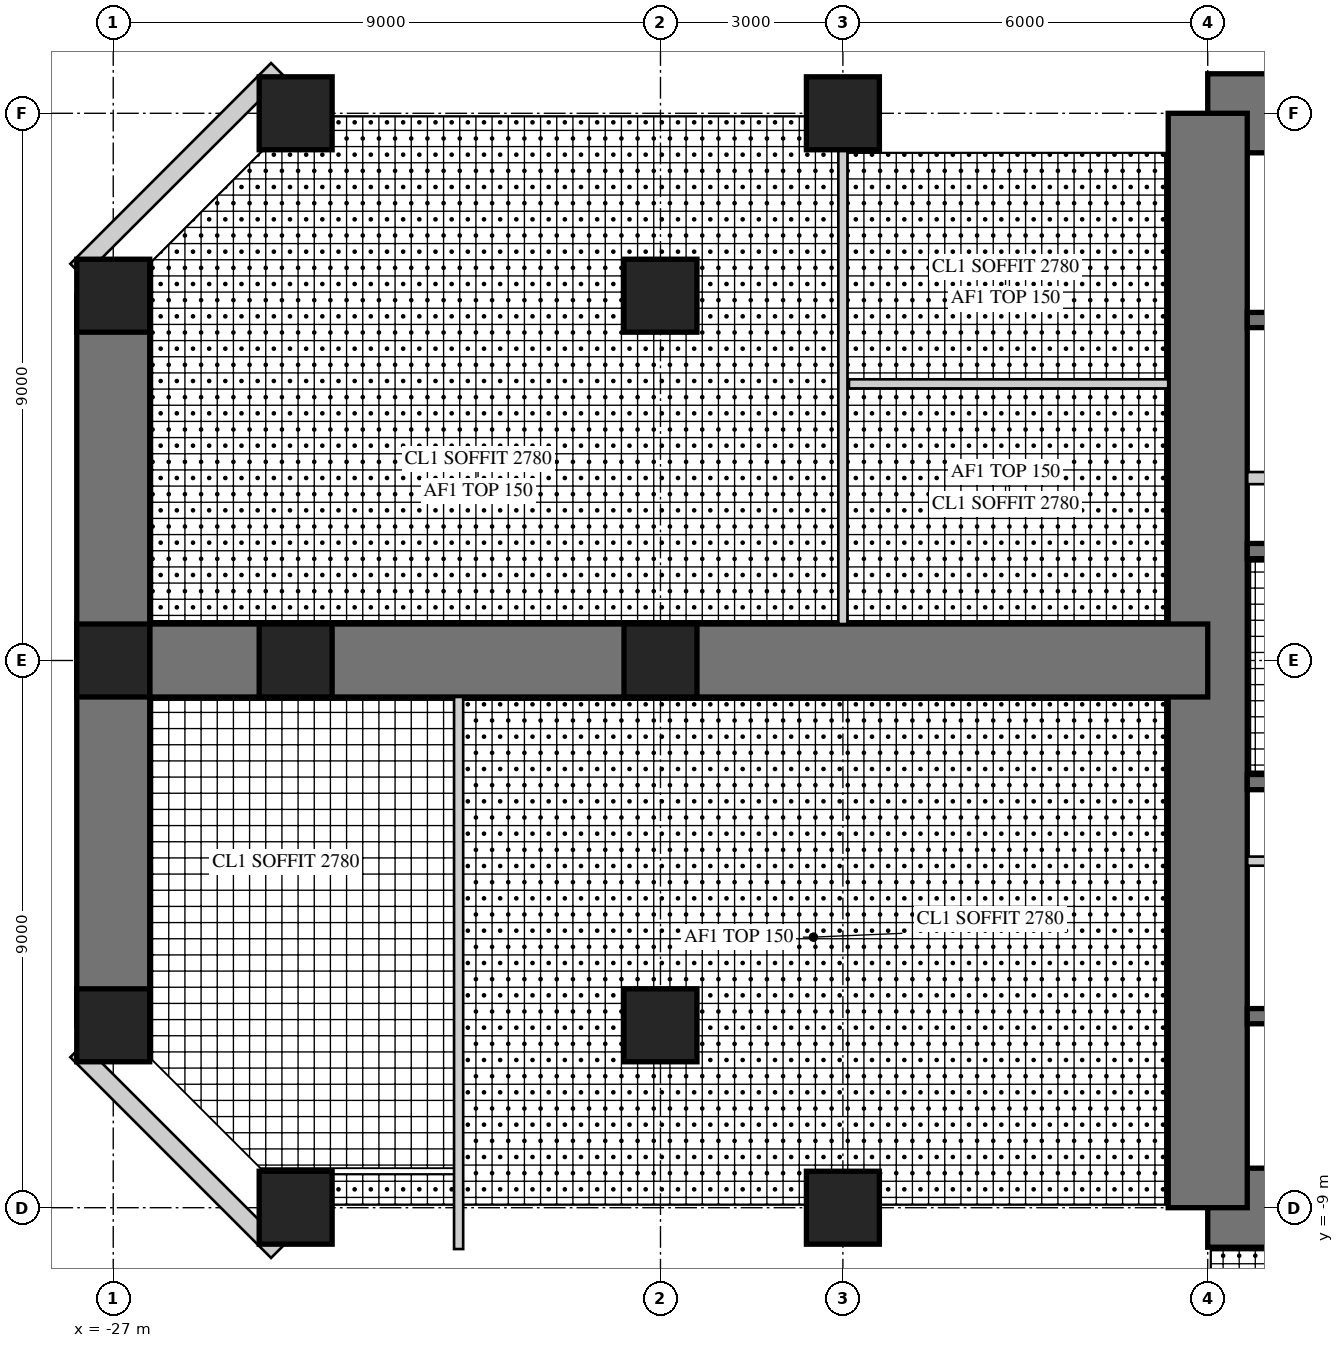
"""IFC4 building model, lengths in metres.
Left out: names, types, materials, properties, quantities, classifications, styles, units other than length and angle.
Written with IfcOpenShell. Run it as: python <this file> out.ifc"""

import sys

from ifc_helpers import new_model, si_unit, direction, frame, frame_2d, origin, origin_2d, place, context, subcontext, project, spatial, rectangle, hollow_rectangle, extrude, element, fill, save


model = new_model("IFC4")
c1 = context("Model", 3, precision=1e-05, world=origin(), true_north=direction((0.0, 1.0)))
c2 = subcontext(c1, "Body", "Model", "MODEL_VIEW")
j1 = project(units=[si_unit("LENGTHUNIT", "METRE"), si_unit("PLANEANGLEUNIT", "RADIAN")], contexts=[c1])
p1 = place(None, origin())
s1 = spatial("IfcSite", under=j1, at=p1, CompositionType="ELEMENT")
p2 = place(p1, origin())
s2 = spatial("IfcBuilding", under=s1, at=p2, CompositionType="ELEMENT")
p3 = place(p2, frame((0.0, 0.0, 59.5)))
s3 = spatial("IfcBuildingStorey", under=s2, at=p3, CompositionType="ELEMENT", Elevation=59.5)
p4 = place(p3, frame((9.0, 9.0, 0.0), z_axis=(0.0, 0.0, 1.0), x_axis=(-1.0, 0.0, 0.0)))
e1 = element("IfcWall", 1, at=p4, inside=s3, PredefinedType="SHEAR", context=c2, shape_type="SweptSolid", body=[
    extrude(rectangle(XDim=18.0, YDim=1.3, at=frame_2d((9.0, 0.0))), origin(), (0.0, 0.0, 1.0), 4.0),
])
p5 = place(p4, frame((9.8, 0.0, 0.0)))
e2 = element("IfcOpeningElement", 2, at=p5, cuts=e1, PredefinedType="OPENING", context=c2, shape_type="SweptSolid", body=[
    extrude(rectangle(XDim=1.0, YDim=2.4, at=frame_2d((0.5, 1.2))), frame((0.0, 0.66, 0.0), z_axis=(0.0, -1.0, 0.0), x_axis=(1.0, 0.0, 0.0)), (0.0, 0.0, 1.0), 1.32),
])
p6 = place(p3, frame((-9.0, -9.0, 0.0), z_axis=(0.0, 0.0, 1.0), x_axis=(1.0, 0.0, 0.0)))
e3 = element("IfcWall", 3, at=p6, inside=s3, PredefinedType="SHEAR", context=c2, shape_type="SweptSolid", body=[
    extrude(rectangle(XDim=18.0, YDim=1.3, at=frame_2d((9.0, 0.0))), origin(), (0.0, 0.0, 1.0), 4.0),
])
p7 = place(p6, frame((9.8, 0.0, 0.0)))
e4 = element("IfcOpeningElement", 4, at=p7, cuts=e3, PredefinedType="OPENING", context=c2, shape_type="SweptSolid", body=[
    extrude(rectangle(XDim=1.0, YDim=2.4, at=frame_2d((0.5, 1.2))), frame((0.0, 0.66, 0.0), z_axis=(0.0, -1.0, 0.0), x_axis=(1.0, 0.0, 0.0)), (0.0, 0.0, 1.0), 1.32),
])
p8 = place(p3, frame((-9.0, 9.0, 0.0), z_axis=(0.0, 0.0, 1.0), x_axis=(0.0, -1.0, 0.0)))
e5 = element("IfcWall", 5, at=p8, inside=s3, PredefinedType="SHEAR", context=c2, shape_type="SweptSolid", body=[
    extrude(rectangle(XDim=18.0, YDim=1.3, at=frame_2d((9.0, 0.0))), origin(), (0.0, 0.0, 1.0), 4.0),
])
p9 = place(p8, frame((9.8, 0.0, 0.0)))
e6 = element("IfcOpeningElement", 6, at=p9, cuts=e5, PredefinedType="OPENING", context=c2, shape_type="SweptSolid", body=[
    extrude(rectangle(XDim=1.0, YDim=2.4, at=frame_2d((0.5, 1.2))), frame((0.0, 0.66, 0.0), z_axis=(0.0, -1.0, 0.0), x_axis=(1.0, 0.0, 0.0)), (0.0, 0.0, 1.0), 1.32),
])
p10 = place(p3, frame((-2.125, 1.8, 0.0), z_axis=(0.0, 0.0, 1.0), x_axis=(-1.0, 0.0, 0.0)))
e7 = element("IfcWall", 7, at=p10, inside=s3, PredefinedType="SHEAR", context=c2, shape_type="SweptSolid", body=[
    extrude(rectangle(XDim=6.225, YDim=0.25, at=frame_2d((3.113, 0.0))), origin(), (0.0, 0.0, 1.0), 4.0),
])
p11 = place(p3, frame((-2.125, 5.6, 0.0), z_axis=(0.0, 0.0, 1.0), x_axis=(-1.0, 0.0, 0.0)))
e8 = element("IfcWall", 8, at=p11, inside=s3, PredefinedType="SHEAR", context=c2, shape_type="SweptSolid", body=[
    extrude(rectangle(XDim=6.225, YDim=0.25, at=frame_2d((3.113, 0.0))), origin(), (0.0, 0.0, 1.0), 4.0),
])
p12 = place(p11, frame((0.175, 0.0, 0.0)))
e9 = element("IfcOpeningElement", 9, at=p12, cuts=e8, PredefinedType="OPENING", context=c2, shape_type="SweptSolid", body=[
    extrude(rectangle(XDim=1.0, YDim=2.1, at=frame_2d((0.5, 1.05))), frame((0.0, 0.135, 0.0), z_axis=(0.0, -1.0, 0.0), x_axis=(1.0, 0.0, 0.0)), (0.0, 0.0, 1.0), 0.27),
])
p13 = place(p3, frame((-5.725, 3.0, 0.0), z_axis=(0.0, 0.0, 1.0), x_axis=(-1.0, 0.0, 0.0)))
e10 = element("IfcWall", 10, at=p13, inside=s3, PredefinedType="PARTITIONING", context=c2, shape_type="SweptSolid", body=[
    extrude(rectangle(XDim=2.625, YDim=0.2, at=frame_2d((1.312, 0.0))), origin(), (0.0, 0.0, 1.0), 4.0),
])
for number, where, z_axis, x_axis in (
    (11, (-1.925, -2.0, 0.0), (0.0, 0.0, 1.0), (-1.0, 0.0, 0.0)),
    (12, (-1.925, -5.85, 0.0), (0.0, 0.0, 1.0), (-1.0, 0.0, 0.0)),
):
    element("IfcWall", number, at=place(p3, frame(where, z_axis=z_axis, x_axis=x_axis)), inside=s3, PredefinedType="SHEAR", context=c2, shape_type="SweptSolid", body=[
        extrude(rectangle(XDim=6.425, YDim=0.25, at=frame_2d((3.212, 0.0))), origin(), (0.0, 0.0, 1.0), 4.0),
    ])
p14 = place(p3, frame((-1.925, -3.3, 0.0), z_axis=(0.0, 0.0, 1.0), x_axis=(-1.0, 0.0, 0.0)))
e13 = element("IfcWall", 13, at=p14, inside=s3, PredefinedType="PARTITIONING", context=c2, shape_type="SweptSolid", body=[
    extrude(rectangle(XDim=6.425, YDim=0.15, at=frame_2d((3.212, 0.0))), origin(), (0.0, 0.0, 1.0), 4.0),
])
p15 = place(p14, frame((0.075, 0.0, 0.0)))
e14 = element("IfcOpeningElement", 14, at=p15, cuts=e13, PredefinedType="OPENING", context=c2, shape_type="SweptSolid", body=[
    extrude(rectangle(XDim=0.8, YDim=2.1, at=frame_2d((0.4, 1.05))), frame((0.0, 0.085, 0.0), z_axis=(0.0, -1.0, 0.0), x_axis=(1.0, 0.0, 0.0)), (0.0, 0.0, 1.0), 0.17),
])
p16 = place(p14, frame((3.675, 0.0, 0.0)))
e15 = element("IfcOpeningElement", 15, at=p16, cuts=e13, PredefinedType="OPENING", context=c2, shape_type="SweptSolid", body=[
    extrude(rectangle(XDim=0.8, YDim=2.1, at=frame_2d((0.4, 1.05))), frame((0.0, 0.085, 0.0), z_axis=(0.0, -1.0, 0.0), x_axis=(1.0, 0.0, 0.0)), (0.0, 0.0, 1.0), 0.17),
])
p17 = place(p3, frame((-9.0, 0.0, 0.0), z_axis=(0.0, 0.0, 1.0), x_axis=(-1.0, 0.0, 0.0)))
e16 = element("IfcWall", 16, at=p17, inside=s3, PredefinedType="SHEAR", context=c2, shape_type="SweptSolid", body=[
    extrude(rectangle(XDim=18.0, YDim=1.2, at=frame_2d((9.0, 0.0))), origin(), (0.0, 0.0, 1.0), 4.0),
])
p18 = place(p17, frame((9.9, 0.0, 0.0)))
e17 = element("IfcOpeningElement", 17, at=p18, cuts=e16, PredefinedType="OPENING", context=c2, shape_type="SweptSolid", body=[
    extrude(rectangle(XDim=1.0, YDim=2.2, at=frame_2d((0.5, 1.1))), frame((0.0, 0.61, 0.0), z_axis=(0.0, -1.0, 0.0), x_axis=(1.0, 0.0, 0.0)), (0.0, 0.0, 1.0), 1.22),
])
p19 = place(p3, frame((-27.0, 6.0, 0.0), z_axis=(0.0, 0.0, 1.0), x_axis=(0.0, -1.0, 0.0)))
e18 = element("IfcWall", 18, at=p19, inside=s3, PredefinedType="SHEAR", context=c2, shape_type="SweptSolid", body=[
    extrude(rectangle(XDim=12.0, YDim=1.2, at=frame_2d((6.0, 0.0))), origin(), (0.0, 0.0, 1.0), 4.0),
])
p20 = place(p19, frame((1.6, 0.0, 0.6)))
e19 = element("IfcOpeningElement", 19, at=p20, cuts=e18, PredefinedType="OPENING", context=c2, shape_type="SweptSolid", body=[
    extrude(rectangle(XDim=3.0, YDim=2.4, at=frame_2d((1.5, 1.2))), frame((0.0, 0.61, 0.0), z_axis=(0.0, -1.0, 0.0), x_axis=(1.0, 0.0, 0.0)), (0.0, 0.0, 1.0), 1.22),
])
p21 = place(p19, frame((7.4, 0.0, 0.6)))
e20 = element("IfcOpeningElement", 20, at=p21, cuts=e18, PredefinedType="OPENING", context=c2, shape_type="SweptSolid", body=[
    extrude(rectangle(XDim=3.0, YDim=2.4, at=frame_2d((1.5, 1.2))), frame((0.0, 0.61, 0.0), z_axis=(0.0, -1.0, 0.0), x_axis=(1.0, 0.0, 0.0)), (0.0, 0.0, 1.0), 1.22),
])
for number, where, z_axis, x_axis in (
    (21, (-15.0, 9.0, 0.0), (0.0, 0.0, 1.0), (1.0, 0.0, 0.0)),
    (22, (-24.0, 9.0, 0.0), (0.0, 0.0, 1.0), (1.0, 0.0, 0.0)),
    (23, (-15.0, -9.0, 0.0), (0.0, 0.0, 1.0), (1.0, 0.0, 0.0)),
    (24, (-24.0, -9.0, 0.0), (0.0, 0.0, 1.0), (1.0, 0.0, 0.0)),
    (25, (-27.0, 6.0, 0.0), (0.0, 0.0, 1.0), (1.0, 0.0, 0.0)),
    (26, (-27.0, 0.0, 0.0), (0.0, 0.0, 1.0), (1.0, 0.0, 0.0)),
    (27, (-27.0, -6.0, 0.0), (0.0, 0.0, 1.0), (1.0, 0.0, 0.0)),
    (28, (-18.0, 6.0, 0.0), (0.0, 0.0, 1.0), (1.0, 0.0, 0.0)),
    (29, (-18.0, 0.0, 0.0), (0.0, 0.0, 1.0), (1.0, 0.0, 0.0)),
    (30, (-18.0, -6.0, 0.0), (0.0, 0.0, 1.0), (1.0, 0.0, 0.0)),
    (31, (-24.0, 0.0, 0.0), (0.0, 0.0, 1.0), (1.0, 0.0, 0.0)),
):
    element("IfcColumn", number, at=place(p3, frame(where, z_axis=z_axis, x_axis=x_axis)), inside=s3, PredefinedType="COLUMN", context=c2, shape_type="SweptSolid", body=[
        extrude(rectangle(XDim=1.2, YDim=1.2, at=origin_2d()), origin(), (0.0, 0.0, 1.0), 4.0),
    ])
p22 = place(p3, frame((-24.298, 9.72, 0.0), z_axis=(0.0, 0.0, 1.0), x_axis=(-0.707106781187, -0.707106781187, 0.0)))
e32 = element("IfcWall", 32, at=p22, inside=s3, PredefinedType="SOLIDWALL", context=c2, shape_type="SweptSolid", body=[
    extrude(rectangle(XDim=4.669, YDim=0.3, at=frame_2d((2.335, 0.0))), origin(), (0.0, 0.0, 1.0), 3.8),
])
p23 = place(p22, frame((1.885, 0.0, 0.3)))
e33 = element("IfcOpeningElement", 33, at=p23, cuts=e32, PredefinedType="OPENING", context=c2, shape_type="SweptSolid", body=[
    extrude(rectangle(XDim=0.9, YDim=2.4, at=frame_2d((0.45, 1.2))), frame((0.0, 0.16, 0.0), z_axis=(0.0, -1.0, 0.0), x_axis=(1.0, 0.0, 0.0)), (0.0, 0.0, 1.0), 0.32),
])
p24 = place(p3, frame((-27.6, -6.418, 0.0), z_axis=(0.0, 0.0, 1.0), x_axis=(0.707106781187, -0.707106781187, 0.0)))
e34 = element("IfcWall", 34, at=p24, inside=s3, PredefinedType="SOLIDWALL", context=c2, shape_type="SweptSolid", body=[
    extrude(rectangle(XDim=4.669, YDim=0.3, at=frame_2d((2.335, 0.0))), origin(), (0.0, 0.0, 1.0), 3.8),
])
p25 = place(p24, frame((1.885, 0.0, 0.3)))
e35 = element("IfcOpeningElement", 35, at=p25, cuts=e34, PredefinedType="OPENING", context=c2, shape_type="SweptSolid", body=[
    extrude(rectangle(XDim=0.9, YDim=2.4, at=frame_2d((0.45, 1.2))), frame((0.0, 0.16, 0.0), z_axis=(0.0, -1.0, 0.0), x_axis=(1.0, 0.0, 0.0)), (0.0, 0.0, 1.0), 0.32),
])
p26 = place(p3, frame((-15.0, 8.4, 0.0), z_axis=(0.0, 0.0, 1.0), x_axis=(0.0, -1.0, 0.0)))
e36 = element("IfcWall", 36, at=p26, inside=s3, PredefinedType="PARTITIONING", context=c2, shape_type="SweptSolid", body=[
    extrude(rectangle(XDim=7.8, YDim=0.15, at=frame_2d((3.9, 0.0))), origin(), (0.0, 0.0, 1.0), 2.95),
])
p27 = place(p26, frame((1.425, 0.0, 0.0)))
e37 = element("IfcOpeningElement", 37, at=p27, cuts=e36, PredefinedType="OPENING", context=c2, shape_type="SweptSolid", body=[
    extrude(rectangle(XDim=1.0, YDim=2.1, at=frame_2d((0.5, 1.05))), frame((0.0, 0.085, 0.0), z_axis=(0.0, -1.0, 0.0), x_axis=(1.0, 0.0, 0.0)), (0.0, 0.0, 1.0), 0.17),
])
p28 = place(p26, frame((5.325, 0.0, 0.0)))
e38 = element("IfcOpeningElement", 38, at=p28, cuts=e36, PredefinedType="OPENING", context=c2, shape_type="SweptSolid", body=[
    extrude(rectangle(XDim=1.0, YDim=2.1, at=frame_2d((0.5, 1.05))), frame((0.0, 0.085, 0.0), z_axis=(0.0, -1.0, 0.0), x_axis=(1.0, 0.0, 0.0)), (0.0, 0.0, 1.0), 0.17),
])
p29 = place(p3, frame((-9.65, 4.55, 0.0), z_axis=(0.0, 0.0, 1.0), x_axis=(-1.0, 0.0, 0.0)))
e39 = element("IfcWall", 39, at=p29, inside=s3, PredefinedType="PARTITIONING", context=c2, shape_type="SweptSolid", body=[
    extrude(rectangle(XDim=5.25, YDim=0.15, at=frame_2d((2.625, 0.0))), origin(), (0.0, 0.0, 1.0), 3.8),
])
p30 = place(p3, frame((-21.32, -0.6, 0.0), z_axis=(0.0, 0.0, 1.0), x_axis=(0.0, -1.0, 0.0)))
e40 = element("IfcWall", 40, at=p30, inside=s3, PredefinedType="PARTITIONING", context=c2, shape_type="SweptSolid", body=[
    extrude(rectangle(XDim=9.08, YDim=0.15, at=frame_2d((4.54, 0.0))), origin(), (0.0, 0.0, 1.0), 3.8),
])
p31 = place(p30, frame((0.45, 0.0, 0.0)))
e41 = element("IfcOpeningElement", 41, at=p31, cuts=e40, PredefinedType="OPENING", context=c2, shape_type="SweptSolid", body=[
    extrude(rectangle(XDim=1.0, YDim=2.2, at=frame_2d((0.5, 1.1))), frame((0.0, 0.085, 0.0), z_axis=(0.0, -1.0, 0.0), x_axis=(1.0, 0.0, 0.0)), (0.0, 0.0, 1.0), 0.17),
])
p32 = place(p23, origin())
e42 = element("IfcWindow", 42, at=p32, inside=s3, PartitioningType="SINGLE_PANEL", PredefinedType="WINDOW", context=c2, shape_type="SweptSolid", body=[
    extrude(hollow_rectangle(XDim=0.9, YDim=2.4, WallThickness=0.06, at=frame_2d((0.45, 1.2))), frame((0.0, 0.03, 0.0), z_axis=(0.0, -1.0, 0.0), x_axis=(1.0, 0.0, 0.0)), (0.0, 0.0, 1.0), 0.06),
    extrude(rectangle(XDim=0.779, YDim=2.279, at=frame_2d((0.45, 1.2))), frame((0.0, 0.03, 0.0), z_axis=(0.0, -1.0, 0.0), x_axis=(1.0, 0.0, 0.0)), (0.0, 0.0, 1.0), 0.06),
])
fill(e33, e42)
p33 = place(p20, origin())
e43 = element("IfcWindow", 43, at=p33, inside=s3, PartitioningType="SINGLE_PANEL", PredefinedType="WINDOW", context=c2, shape_type="SweptSolid", body=[
    extrude(hollow_rectangle(XDim=3.0, YDim=2.4, WallThickness=0.06, at=frame_2d((1.5, 1.2))), frame((0.0, 0.03, 0.0), z_axis=(0.0, -1.0, 0.0), x_axis=(1.0, 0.0, 0.0)), (0.0, 0.0, 1.0), 0.06),
    extrude(rectangle(XDim=2.879, YDim=2.279, at=frame_2d((1.5, 1.2))), frame((0.0, 0.03, 0.0), z_axis=(0.0, -1.0, 0.0), x_axis=(1.0, 0.0, 0.0)), (0.0, 0.0, 1.0), 0.06),
])
fill(e19, e43)
p34 = place(p21, origin())
e44 = element("IfcWindow", 44, at=p34, inside=s3, PartitioningType="SINGLE_PANEL", PredefinedType="WINDOW", context=c2, shape_type="SweptSolid", body=[
    extrude(hollow_rectangle(XDim=3.0, YDim=2.4, WallThickness=0.06, at=frame_2d((1.5, 1.2))), frame((0.0, 0.03, 0.0), z_axis=(0.0, -1.0, 0.0), x_axis=(1.0, 0.0, 0.0)), (0.0, 0.0, 1.0), 0.06),
    extrude(rectangle(XDim=2.879, YDim=2.279, at=frame_2d((1.5, 1.2))), frame((0.0, 0.03, 0.0), z_axis=(0.0, -1.0, 0.0), x_axis=(1.0, 0.0, 0.0)), (0.0, 0.0, 1.0), 0.06),
])
fill(e20, e44)
p35 = place(p25, origin())
e45 = element("IfcWindow", 45, at=p35, inside=s3, PartitioningType="SINGLE_PANEL", PredefinedType="WINDOW", context=c2, shape_type="SweptSolid", body=[
    extrude(hollow_rectangle(XDim=0.9, YDim=2.4, WallThickness=0.06, at=frame_2d((0.45, 1.2))), frame((0.0, 0.03, 0.0), z_axis=(0.0, -1.0, 0.0), x_axis=(1.0, 0.0, 0.0)), (0.0, 0.0, 1.0), 0.06),
    extrude(rectangle(XDim=0.779, YDim=2.279, at=frame_2d((0.45, 1.2))), frame((0.0, 0.03, 0.0), z_axis=(0.0, -1.0, 0.0), x_axis=(1.0, 0.0, 0.0)), (0.0, 0.0, 1.0), 0.06),
])
fill(e35, e45)
p36 = place(p27, origin())
e46 = element("IfcDoor", 46, at=p36, inside=s3, OperationType="SINGLE_SWING_RIGHT", PredefinedType="DOOR", context=c2, shape_type="SweptSolid", body=[
    extrude(rectangle(XDim=1.0, YDim=2.1, at=frame_2d((0.5, 1.05))), frame((0.0, 0.025, 0.0), z_axis=(0.0, -1.0, 0.0), x_axis=(1.0, 0.0, 0.0)), (0.0, 0.0, 1.0), 0.05),
])
fill(e37, e46)
p37 = place(p28, origin())
e47 = element("IfcDoor", 47, at=p37, inside=s3, OperationType="SINGLE_SWING_LEFT", PredefinedType="DOOR", context=c2, shape_type="SweptSolid", body=[
    extrude(rectangle(XDim=1.0, YDim=2.1, at=frame_2d((0.5, 1.05))), frame((0.0, 0.025, 0.0), z_axis=(0.0, -1.0, 0.0), x_axis=(1.0, 0.0, 0.0)), (0.0, 0.0, 1.0), 0.05),
])
fill(e38, e47)
p38 = place(p31, frame((1.0, 0.0, 0.0), z_axis=(0.0, 0.0, 1.0), x_axis=(-1.0, 0.0, 0.0)))
e48 = element("IfcDoor", 48, at=p38, inside=s3, OperationType="SINGLE_SWING_RIGHT", PredefinedType="DOOR", context=c2, shape_type="SweptSolid", body=[
    extrude(rectangle(XDim=1.0, YDim=2.2, at=frame_2d((0.5, 1.1))), frame((0.0, 0.025, 0.0), z_axis=(0.0, -1.0, 0.0), x_axis=(1.0, 0.0, 0.0)), (0.0, 0.0, 1.0), 0.05),
])
fill(e41, e48)
p39 = place(p18, frame((1.0, 0.0, 0.0), z_axis=(0.0, 0.0, 1.0), x_axis=(-1.0, 0.0, 0.0)))
e49 = element("IfcDoor", 49, at=p39, inside=s3, OperationType="SINGLE_SWING_RIGHT", PredefinedType="DOOR", context=c2, shape_type="SweptSolid", body=[
    extrude(rectangle(XDim=1.0, YDim=2.2, at=frame_2d((0.5, 1.1))), frame((0.0, 0.025, 0.0), z_axis=(0.0, -1.0, 0.0), x_axis=(1.0, 0.0, 0.0)), (0.0, 0.0, 1.0), 0.05),
])
fill(e17, e49)
p40 = place(p9, frame((1.0, 0.0, 0.0), z_axis=(0.0, 0.0, 1.0), x_axis=(-1.0, 0.0, 0.0)))
e50 = element("IfcDoor", 50, at=p40, inside=s3, OperationType="SINGLE_SWING_RIGHT", PredefinedType="DOOR", context=c2, shape_type="SweptSolid", body=[
    extrude(rectangle(XDim=1.0, YDim=2.4, at=frame_2d((0.5, 1.2))), frame((0.0, -0.005, 0.0), z_axis=(0.0, -1.0, 0.0), x_axis=(1.0, 0.0, 0.0)), (0.0, 0.0, 1.0), 0.05),
])
fill(e6, e50)
save(model, sys.argv[1])
